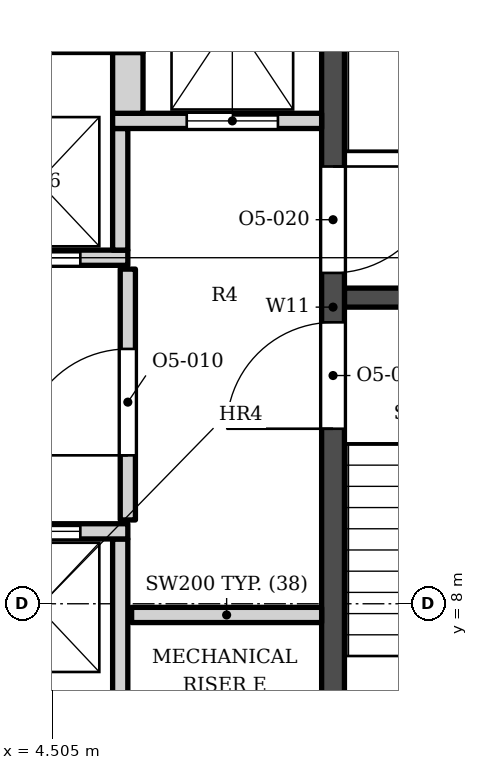
"""IFC4 building model, lengths in metres.
Left out: names, types, materials, properties, quantities, classifications, styles, units other than length and angle.
Written with IfcOpenShell. Run it as: python <this file> out.ifc"""

import sys

from ifc_helpers import new_model, si_unit, direction, frame, frame_2d, origin, place, context, subcontext, project, spatial, rectangle, extrude, element, fill, save


model = new_model("IFC4")
c1 = context("Model", 3, precision=1e-05, world=origin(), true_north=direction((0.0, 1.0)))
c2 = subcontext(c1, "Body", "Model", "MODEL_VIEW")
j1 = project(units=[si_unit("LENGTHUNIT", "METRE"), si_unit("PLANEANGLEUNIT", "RADIAN")], contexts=[c1])
p1 = place(None, origin())
s1 = spatial("IfcSite", under=j1, at=p1, CompositionType="ELEMENT")
p2 = place(p1, origin())
s2 = spatial("IfcBuilding", under=s1, at=p2, CompositionType="ELEMENT")
p3 = place(p2, frame((0.0, 0.0, 196.4)))
s3 = spatial("IfcBuildingStorey", under=s2, at=p3, CompositionType="ELEMENT", Elevation=196.4)
p4 = place(p3, frame((8.2, 5.253, 0.0), z_axis=(0.0, 0.0, 1.0), x_axis=(0.0, 1.0, 0.0)))
e1 = element("IfcWall", 1, at=p4, inside=s3, PredefinedType="SHEAR", context=c2, shape_type="SweptSolid", body=[
    extrude(rectangle(XDim=13.3, YDim=0.3, at=frame_2d((6.65, 0.0))), origin(), (0.0, 0.0, 1.0), 3.9),
])
p5 = place(p4, frame((7.1, 0.0, 0.0)))
e2 = element("IfcOpeningElement", 2, at=p5, cuts=e1, PredefinedType="OPENING", context=c2, shape_type="SweptSolid", body=[
    extrude(rectangle(XDim=1.4, YDim=2.1, at=frame_2d((0.7, 1.05))), frame((0.0, 0.16, 0.0), z_axis=(0.0, -1.0, 0.0), x_axis=(1.0, 0.0, 0.0)), (0.0, 0.0, 1.0), 0.32),
])
p6 = place(p4, frame((5.05, 0.0, 0.0)))
e3 = element("IfcOpeningElement", 3, at=p6, cuts=e1, PredefinedType="OPENING", context=c2, shape_type="SweptSolid", body=[
    extrude(rectangle(XDim=1.4, YDim=2.1, at=frame_2d((0.7, 1.05))), frame((0.0, 0.16, 0.0), z_axis=(0.0, -1.0, 0.0), x_axis=(1.0, 0.0, 0.0)), (0.0, 0.0, 1.0), 0.32),
])
p7 = place(p3, frame((8.35, 12.028, 0.0), z_axis=(0.0, 0.0, 1.0), x_axis=(1.0, 0.0, 0.0)))
e4 = element("IfcWall", 4, at=p7, inside=s3, PredefinedType="SHEAR", context=c2, shape_type="SweptSolid", body=[
    extrude(rectangle(XDim=3.75, YDim=0.25, at=frame_2d((1.875, 0.0))), origin(), (0.0, 0.0, 1.0), 3.9),
])
for number, where, z_axis, x_axis in (
    (5, (5.4, 6.353, 0.0), (0.0, 0.0, 1.0), (0.0, 1.0, 0.0)),
    (6, (5.55, 7.853, 0.0), (0.0, 0.0, 1.0), (1.0, 0.0, 0.0)),
):
    element("IfcWall", number, at=place(p3, frame(where, z_axis=z_axis, x_axis=x_axis)), inside=s3, PredefinedType="SOLIDWALL", context=c2, shape_type="SweptSolid", body=[
        extrude(rectangle(XDim=2.5, YDim=0.2, at=frame_2d((1.25, 0.0))), origin(), (0.0, 0.0, 1.0), 3.73),
    ])
p8 = place(p3, frame((1.0, 8.953, 0.0), z_axis=(0.0, 0.0, 1.0), x_axis=(1.0, 0.0, 0.0)))
e7 = element("IfcWall", 7, at=p8, inside=s3, PredefinedType="SOLIDWALL", context=c2, shape_type="SweptSolid", body=[
    extrude(rectangle(XDim=4.5, YDim=0.2, at=frame_2d((2.25, 0.0))), origin(), (0.0, 0.0, 1.0), 3.73),
])
p9 = place(p8, frame((0.625, 0.0, 0.0)))
e8 = element("IfcOpeningElement", 8, at=p9, cuts=e7, PredefinedType="OPENING", context=c2, shape_type="SweptSolid", body=[
    extrude(rectangle(XDim=1.1, YDim=2.1, at=frame_2d((0.55, 1.05))), frame((0.0, 0.11, 0.0), z_axis=(0.0, -1.0, 0.0), x_axis=(1.0, 0.0, 0.0)), (0.0, 0.0, 1.0), 0.22),
])
p10 = place(p8, frame((2.775, 0.0, 0.0)))
e9 = element("IfcOpeningElement", 9, at=p10, cuts=e7, PredefinedType="OPENING", context=c2, shape_type="SweptSolid", body=[
    extrude(rectangle(XDim=1.1, YDim=2.1, at=frame_2d((0.55, 1.05))), frame((0.0, 0.11, 0.0), z_axis=(0.0, -1.0, 0.0), x_axis=(1.0, 0.0, 0.0)), (0.0, 0.0, 1.0), 0.22),
])
p11 = place(p3, frame((5.5, 9.103, 0.0), z_axis=(0.0, 0.0, 1.0), x_axis=(0.0, 1.0, 0.0)))
e10 = element("IfcWall", 10, at=p11, inside=s3, PredefinedType="SOLIDWALL", context=c2, shape_type="SweptSolid", body=[
    extrude(rectangle(XDim=3.3, YDim=0.2, at=frame_2d((1.65, 0.0))), origin(), (0.0, 0.0, 1.0), 3.73),
])
p12 = place(p11, frame((0.85, 0.0, 0.0)))
e11 = element("IfcOpeningElement", 11, at=p12, cuts=e10, PredefinedType="OPENING", context=c2, shape_type="SweptSolid", body=[
    extrude(rectangle(XDim=1.4, YDim=2.1, at=frame_2d((0.7, 1.05))), frame((0.0, 0.11, 0.0), z_axis=(0.0, -1.0, 0.0), x_axis=(1.0, 0.0, 0.0)), (0.0, 0.0, 1.0), 0.22),
])
p13 = place(p3, frame((-1.5, 12.552, 0.0), z_axis=(0.0, 0.0, 1.0), x_axis=(1.0, 0.0, 0.0)))
e12 = element("IfcWall", 12, at=p13, inside=s3, PredefinedType="SOLIDWALL", context=c2, shape_type="SweptSolid", body=[
    extrude(rectangle(XDim=7.0, YDim=0.2, at=frame_2d((3.5, 0.0))), origin(), (0.0, 0.0, 1.0), 3.73),
])
p14 = place(p13, frame((3.075, 0.0, 0.0)))
e13 = element("IfcOpeningElement", 13, at=p14, cuts=e12, PredefinedType="OPENING", context=c2, shape_type="SweptSolid", body=[
    extrude(rectangle(XDim=1.1, YDim=2.1, at=frame_2d((0.55, 1.05))), frame((0.0, 0.11, 0.0), z_axis=(0.0, -1.0, 0.0), x_axis=(1.0, 0.0, 0.0)), (0.0, 0.0, 1.0), 0.22),
])
p15 = place(p13, frame((5.275, 0.0, 0.0)))
e14 = element("IfcOpeningElement", 14, at=p15, cuts=e12, PredefinedType="OPENING", context=c2, shape_type="SweptSolid", body=[
    extrude(rectangle(XDim=1.1, YDim=2.1, at=frame_2d((0.55, 1.05))), frame((0.0, 0.11, 0.0), z_axis=(0.0, -1.0, 0.0), x_axis=(1.0, 0.0, 0.0)), (0.0, 0.0, 1.0), 0.22),
])
p16 = place(p3, frame((5.4, 12.653, 0.0), z_axis=(0.0, 0.0, 1.0), x_axis=(0.0, 1.0, 0.0)))
e15 = element("IfcWall", 15, at=p16, inside=s3, PredefinedType="SOLIDWALL", context=c2, shape_type="SweptSolid", body=[
    extrude(rectangle(XDim=1.6, YDim=0.2, at=frame_2d((0.8, 0.0))), origin(), (0.0, 0.0, 1.0), 3.73),
])
p17 = place(p3, frame((5.3, 14.353, 0.0), z_axis=(0.0, 0.0, 1.0), x_axis=(1.0, 0.0, 0.0)))
e16 = element("IfcWall", 16, at=p17, inside=s3, PredefinedType="SOLIDWALL", context=c2, shape_type="SweptSolid", body=[
    extrude(rectangle(XDim=2.75, YDim=0.2, at=frame_2d((1.375, 0.0))), origin(), (0.0, 0.0, 1.0), 3.73),
])
p18 = place(p17, frame((0.975, 0.0, 0.0)))
e17 = element("IfcOpeningElement", 17, at=p18, cuts=e16, PredefinedType="OPENING", context=c2, shape_type="SweptSolid", body=[
    extrude(rectangle(XDim=1.2, YDim=2.1, at=frame_2d((0.6, 1.05))), frame((0.0, 0.11, 0.0), z_axis=(0.0, -1.0, 0.0), x_axis=(1.0, 0.0, 0.0)), (0.0, 0.0, 1.0), 0.22),
])
p19 = place(p3, frame((5.5, 14.453, 0.0), z_axis=(0.0, 0.0, 1.0), x_axis=(0.0, 1.0, 0.0)))
e18 = element("IfcWall", 18, at=p19, inside=s3, PredefinedType="SOLIDWALL", context=c2, shape_type="SweptSolid", body=[
    extrude(rectangle(XDim=0.8, YDim=0.4, at=frame_2d((0.4, 0.0))), origin(), (0.0, 0.0, 1.0), 3.73),
])
p20 = place(p3, frame((-1.5, 15.353, 0.0), z_axis=(0.0, 0.0, 1.0), x_axis=(1.0, 0.0, 0.0)))
e19 = element("IfcWall", 19, at=p20, inside=s3, PredefinedType="SOLIDWALL", context=c2, shape_type="SweptSolid", body=[
    extrude(rectangle(XDim=7.2, YDim=0.2, at=frame_2d((3.6, 0.0))), origin(), (0.0, 0.0, 1.0), 3.73),
])
p21 = place(p10, origin())
e20 = element("IfcDoor", 20, at=p21, inside=s3, OperationType="DOUBLE_DOOR_SLIDING", PredefinedType="DOOR", context=c2, shape_type="SweptSolid", body=[
    extrude(rectangle(XDim=1.1, YDim=2.1, at=frame_2d((0.55, 1.05))), frame((0.0, 0.025, 0.0), z_axis=(0.0, -1.0, 0.0), x_axis=(1.0, 0.0, 0.0)), (0.0, 0.0, 1.0), 0.05),
])
fill(e9, e20)
p22 = place(p15, origin())
e21 = element("IfcDoor", 21, at=p22, inside=s3, OperationType="DOUBLE_DOOR_SLIDING", PredefinedType="DOOR", context=c2, shape_type="SweptSolid", body=[
    extrude(rectangle(XDim=1.1, YDim=2.1, at=frame_2d((0.55, 1.05))), frame((0.0, 0.025, 0.0), z_axis=(0.0, -1.0, 0.0), x_axis=(1.0, 0.0, 0.0)), (0.0, 0.0, 1.0), 0.05),
])
fill(e14, e21)
p23 = place(p18, origin())
e22 = element("IfcDoor", 22, at=p23, inside=s3, OperationType="DOUBLE_DOOR_SLIDING", PredefinedType="DOOR", context=c2, shape_type="SweptSolid", body=[
    extrude(rectangle(XDim=1.2, YDim=2.1, at=frame_2d((0.6, 1.05))), frame((0.0, 0.025, 0.0), z_axis=(0.0, -1.0, 0.0), x_axis=(1.0, 0.0, 0.0)), (0.0, 0.0, 1.0), 0.05),
])
fill(e17, e22)
p24 = place(p5, origin())
e23 = element("IfcDoor", 23, at=p24, inside=s3, OperationType="SINGLE_SWING_RIGHT", PredefinedType="DOOR", context=c2, shape_type="SweptSolid", body=[
    extrude(rectangle(XDim=1.4, YDim=2.1, at=frame_2d((0.7, 1.05))), frame((0.0, 0.025, 0.0), z_axis=(0.0, -1.0, 0.0), x_axis=(1.0, 0.0, 0.0)), (0.0, 0.0, 1.0), 0.05),
])
fill(e2, e23)
p25 = place(p6, origin())
e24 = element("IfcDoor", 24, at=p25, inside=s3, OperationType="SINGLE_SWING_LEFT", PredefinedType="DOOR", context=c2, shape_type="SweptSolid", body=[
    extrude(rectangle(XDim=1.4, YDim=2.1, at=frame_2d((0.7, 1.05))), frame((0.0, 0.025, 0.0), z_axis=(0.0, -1.0, 0.0), x_axis=(1.0, 0.0, 0.0)), (0.0, 0.0, 1.0), 0.05),
])
fill(e3, e24)
p26 = place(p12, origin())
e25 = element("IfcDoor", 25, at=p26, inside=s3, OperationType="SINGLE_SWING_LEFT", PredefinedType="DOOR", context=c2, shape_type="SweptSolid", body=[
    extrude(rectangle(XDim=1.4, YDim=2.1, at=frame_2d((0.7, 1.05))), frame((0.0, 0.025, 0.0), z_axis=(0.0, -1.0, 0.0), x_axis=(1.0, 0.0, 0.0)), (0.0, 0.0, 1.0), 0.05),
])
fill(e11, e25)
save(model, sys.argv[1])
